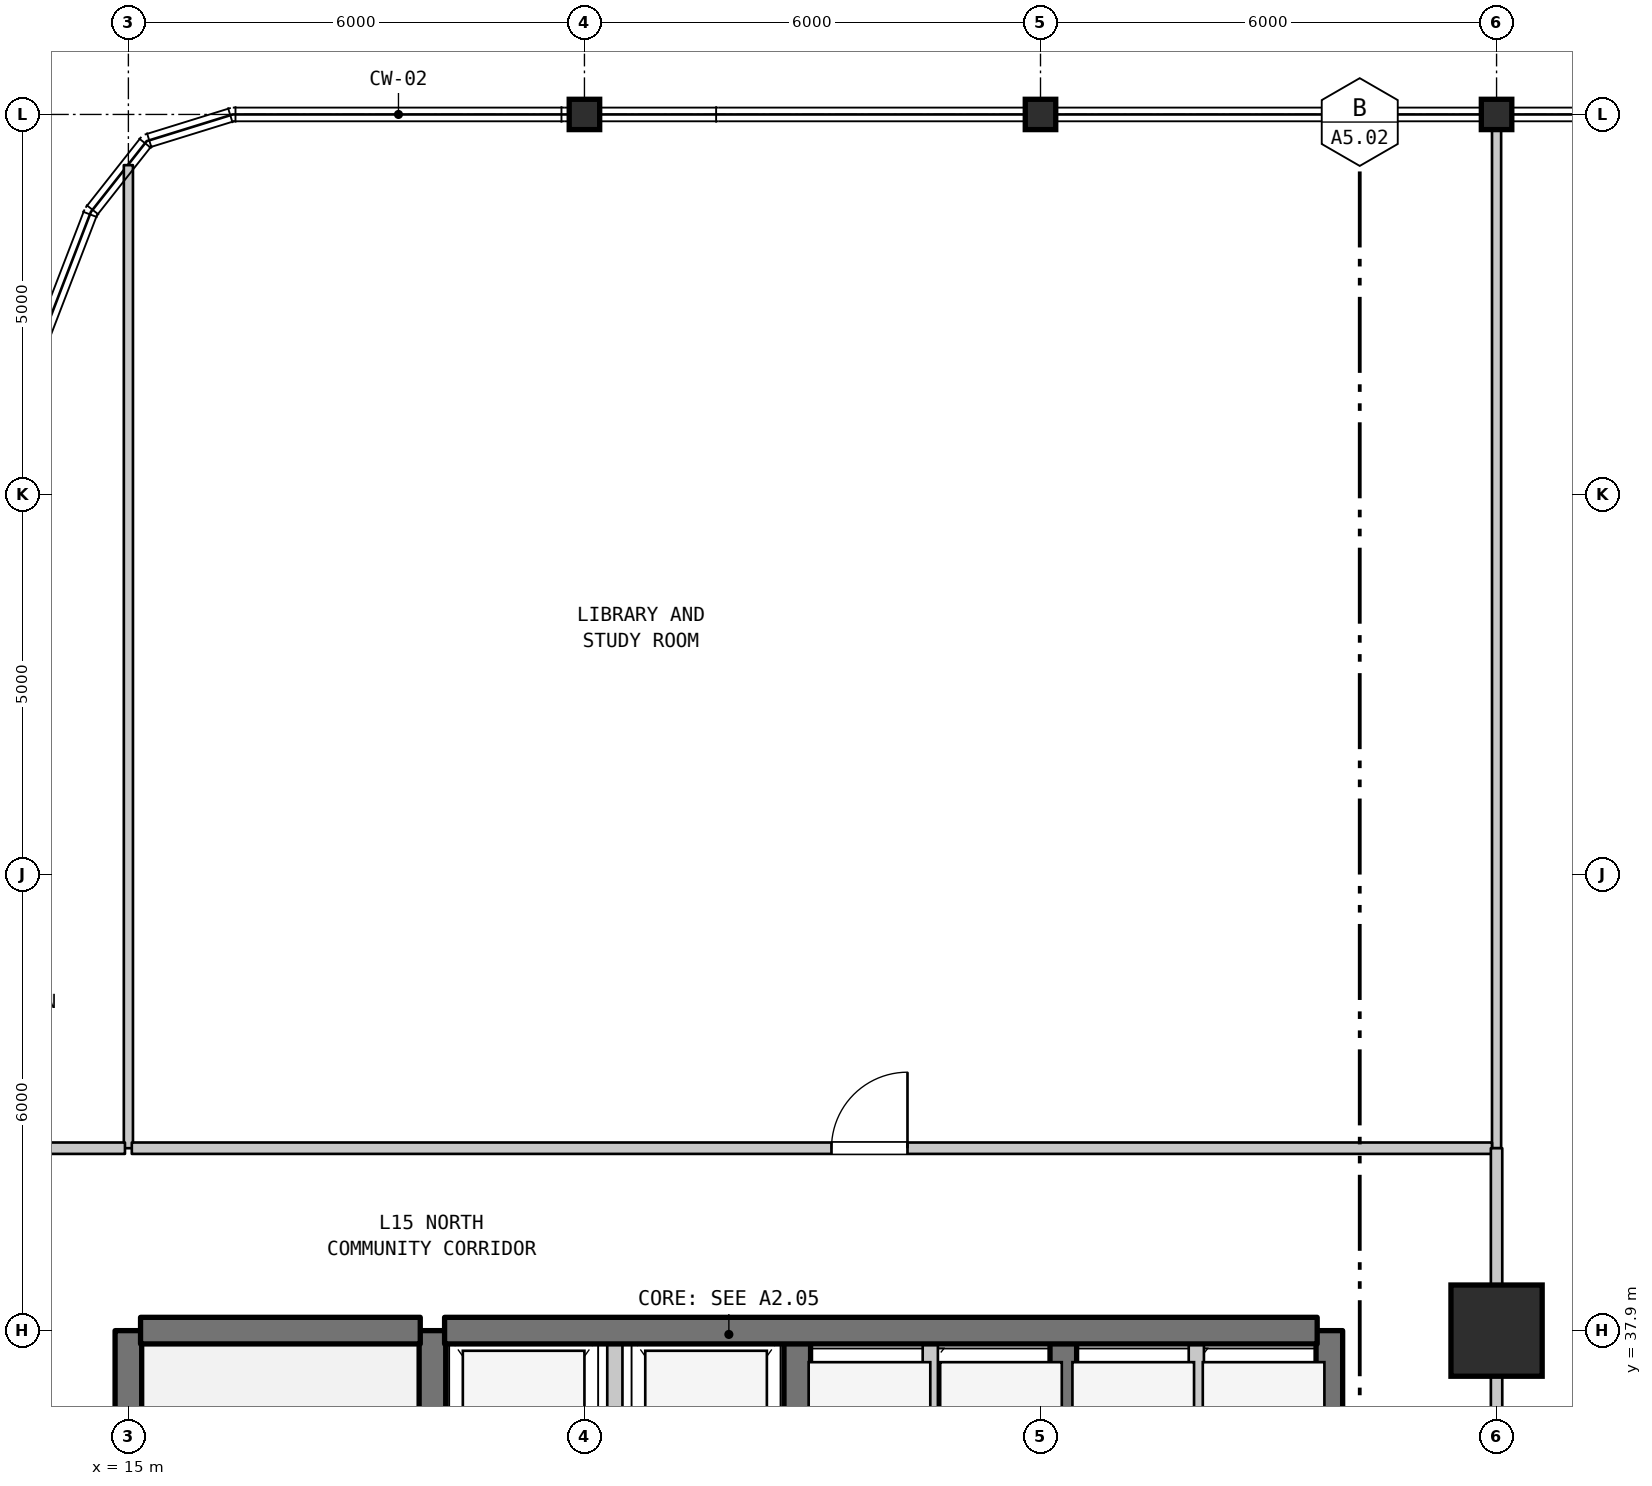
"""IFC4 building model, lengths in metres.
Left out: names, types, materials, properties, quantities, classifications, styles, units other than length and angle.
Written with IfcOpenShell. Run it as: python <this file> out.ifc"""

import sys

from ifc_helpers import new_model, si_unit, direction, frame, frame_2d, origin, origin_2d, place, context, subcontext, project, spatial, rectangle, i_section, extrude, element, fill, save


model = new_model("IFC4")
c1 = context("Model", 3, precision=1e-05, world=origin(), true_north=direction((0.0, 1.0)))
c2 = subcontext(c1, "Body", "Model", "MODEL_VIEW")
j1 = project(units=[si_unit("LENGTHUNIT", "METRE"), si_unit("PLANEANGLEUNIT", "RADIAN")], contexts=[c1])
p1 = place(None, origin())
s1 = spatial("IfcSite", under=j1, at=p1, CompositionType="ELEMENT")
p2 = place(p1, origin())
s2 = spatial("IfcBuilding", under=s1, at=p2, CompositionType="ELEMENT")
p3 = place(p2, frame((0.0, 0.0, 65.6)))
s3 = spatial("IfcBuildingStorey", under=s2, at=p3, CompositionType="ELEMENT", Elevation=65.6)
for number, where, z_axis, x_axis in (
    (1, (21.0, 53.9, 0.0), (0.0, 0.0, 1.0), (1.0, 0.0, 0.0)),
    (2, (27.0, 53.9, 0.0), (0.0, 0.0, 1.0), (1.0, 0.0, 0.0)),
):
    element("IfcColumn", number, at=place(p3, frame(where, z_axis=z_axis, x_axis=x_axis)), inside=s3, PredefinedType="COLUMN", context=c2, shape_type="SweptSolid", body=[
        extrude(i_section(OverallWidth=0.401, OverallDepth=0.399, WebThickness=0.025, FlangeThickness=0.04, FilletRadius=0.015, at=origin_2d()), origin(), (0.0, 0.0, 1.0), 4.5),
    ])
p4 = place(p3, frame((33.0, 37.9, 0.0), z_axis=(0.0, 0.0, 1.0), x_axis=(1.0, 0.0, 0.0)))
e3 = element("IfcColumn", 3, at=p4, inside=s3, PredefinedType="COLUMN", context=c2, shape_type="SweptSolid", body=[
    extrude(rectangle(XDim=1.2, YDim=1.2, at=origin_2d()), origin(), (0.0, 0.0, 1.0), 4.5),
])
p5 = place(p3, frame((33.0, 53.9, 0.0), z_axis=(0.0, 0.0, 1.0), x_axis=(1.0, 0.0, 0.0)))
e4 = element("IfcColumn", 4, at=p5, inside=s3, PredefinedType="COLUMN", context=c2, shape_type="SweptSolid", body=[
    extrude(i_section(OverallWidth=0.401, OverallDepth=0.399, WebThickness=0.025, FlangeThickness=0.04, FilletRadius=0.015, at=origin_2d()), origin(), (0.0, 0.0, 1.0), 4.5),
])
p6 = place(p3, frame((15.0, 31.1, 0.0), z_axis=(0.0, 0.0, 1.0), x_axis=(0.0, 1.0, 0.0)))
e5 = element("IfcWall", 5, at=p6, inside=s3, PredefinedType="SHEAR", context=c2, shape_type="SweptSolid", body=[
    extrude(rectangle(XDim=6.8, YDim=0.35, at=frame_2d((3.4, 0.0))), origin(), (0.0, 0.0, 1.0), 4.185),
])
p7 = place(p3, frame((15.0, 40.3, 0.0), z_axis=(0.0, 0.0, 1.0), x_axis=(0.0, 1.0, 0.0)))
e6 = element("IfcWall", 6, at=p7, inside=s3, PredefinedType="PARTITIONING", context=c2, shape_type="SweptSolid", body=[
    extrude(rectangle(XDim=12.933, YDim=0.12, at=frame_2d((6.466, 0.0))), origin(), (0.0, 0.0, 1.0), 4.185),
])
p8 = place(p3, frame((19.0, 35.0, 0.0), z_axis=(0.0, 0.0, 1.0), x_axis=(0.0, 1.0, 0.0)))
e7 = element("IfcWall", 7, at=p8, inside=s3, PredefinedType="SHEAR", context=c2, shape_type="SweptSolid", body=[
    extrude(rectangle(XDim=2.9, YDim=0.35, at=frame_2d((1.45, 0.0))), origin(), (0.0, 0.0, 1.0), 4.185),
])
p9 = place(p3, frame((21.4, 35.0, 0.0), z_axis=(0.0, 0.0, 1.0), x_axis=(0.0, 1.0, 0.0)))
e8 = element("IfcWall", 8, at=p9, inside=s3, PredefinedType="STANDARD", context=c2, shape_type="SweptSolid", body=[
    extrude(rectangle(XDim=2.9, YDim=0.2, at=frame_2d((1.45, 0.0))), origin(), (0.0, 0.0, 1.0), 4.185),
])
p10 = place(p3, frame((23.8, 35.0, 0.0), z_axis=(0.0, 0.0, 1.0), x_axis=(0.0, 1.0, 0.0)))
e9 = element("IfcWall", 9, at=p10, inside=s3, PredefinedType="SHEAR", context=c2, shape_type="SweptSolid", body=[
    extrude(rectangle(XDim=2.9, YDim=0.35, at=frame_2d((1.45, 0.0))), origin(), (0.0, 0.0, 1.0), 4.185),
])
p11 = place(p3, frame((25.55, 35.0, 0.0), z_axis=(0.0, 0.0, 1.0), x_axis=(0.0, 1.0, 0.0)))
e10 = element("IfcWall", 10, at=p11, inside=s3, PredefinedType="STANDARD", context=c2, shape_type="SweptSolid", body=[
    extrude(rectangle(XDim=2.9, YDim=0.2, at=frame_2d((1.45, 0.0))), origin(), (0.0, 0.0, 1.0), 4.185),
])
p12 = place(p3, frame((27.3, 35.0, 0.0), z_axis=(0.0, 0.0, 1.0), x_axis=(0.0, 1.0, 0.0)))
e11 = element("IfcWall", 11, at=p12, inside=s3, PredefinedType="SHEAR", context=c2, shape_type="SweptSolid", body=[
    extrude(rectangle(XDim=2.9, YDim=0.35, at=frame_2d((1.45, 0.0))), origin(), (0.0, 0.0, 1.0), 4.185),
])
p13 = place(p3, frame((29.05, 35.0, 0.0), z_axis=(0.0, 0.0, 1.0), x_axis=(0.0, 1.0, 0.0)))
e12 = element("IfcWall", 12, at=p13, inside=s3, PredefinedType="STANDARD", context=c2, shape_type="SweptSolid", body=[
    extrude(rectangle(XDim=2.9, YDim=0.2, at=frame_2d((1.45, 0.0))), origin(), (0.0, 0.0, 1.0), 4.185),
])
p14 = place(p3, frame((30.8, 35.0, 0.0), z_axis=(0.0, 0.0, 1.0), x_axis=(0.0, 1.0, 0.0)))
e13 = element("IfcWall", 13, at=p14, inside=s3, PredefinedType="SHEAR", context=c2, shape_type="SweptSolid", body=[
    extrude(rectangle(XDim=2.9, YDim=0.35, at=frame_2d((1.45, 0.0))), origin(), (0.0, 0.0, 1.0), 4.185),
])
p15 = place(p3, frame((33.0, 27.9, 0.0), z_axis=(0.0, 0.0, 1.0), x_axis=(0.0, 1.0, 0.0)))
e14 = element("IfcWall", 14, at=p15, inside=s3, PredefinedType="STANDARD", context=c2, shape_type="SweptSolid", body=[
    extrude(rectangle(XDim=10.0, YDim=0.15, at=frame_2d((5.0, 0.0))), origin(), (0.0, 0.0, 1.0), 3.685),
])
p16 = place(p3, frame((33.0, 40.3, 0.0), z_axis=(0.0, 0.0, 1.0), x_axis=(0.0, 1.0, 0.0)))
e15 = element("IfcWall", 15, at=p16, inside=s3, PredefinedType="PARTITIONING", context=c2, shape_type="SweptSolid", body=[
    extrude(rectangle(XDim=13.59, YDim=0.12, at=frame_2d((6.795, 0.0))), origin(), (0.0, 0.0, 1.0), 3.585),
])
p17 = place(p3, frame((15.16, 37.9, 0.0), z_axis=(0.0, 0.0, 1.0), x_axis=(1.0, 0.0, 0.0)))
e16 = element("IfcWall", 16, at=p17, inside=s3, PredefinedType="SHEAR", context=c2, shape_type="SweptSolid", body=[
    extrude(rectangle(XDim=3.68, YDim=0.35, at=frame_2d((1.84, 0.0))), origin(), (0.0, 0.0, 1.0), 4.185),
])
p18 = place(p3, frame((19.16, 37.9, 0.0), z_axis=(0.0, 0.0, 1.0), x_axis=(1.0, 0.0, 0.0)))
e17 = element("IfcWall", 17, at=p18, inside=s3, PredefinedType="SHEAR", context=c2, shape_type="SweptSolid", body=[
    extrude(rectangle(XDim=11.48, YDim=0.35, at=frame_2d((5.74, 0.0))), origin(), (0.0, 0.0, 1.0), 4.185),
])
p19 = place(p3, frame((12.66, 40.3, 0.0), z_axis=(0.0, 0.0, 1.0), x_axis=(1.0, 0.0, 0.0)))
e18 = element("IfcWall", 18, at=p19, inside=s3, PredefinedType="STANDARD", context=c2, shape_type="SweptSolid", body=[
    extrude(rectangle(XDim=2.295, YDim=0.15, at=frame_2d((1.147, 0.0))), origin(), (0.0, 0.0, 1.0), 4.185),
])
p20 = place(p3, frame((15.045, 40.3, 0.0), z_axis=(0.0, 0.0, 1.0), x_axis=(1.0, 0.0, 0.0)))
e19 = element("IfcWall", 19, at=p20, inside=s3, PredefinedType="STANDARD", context=c2, shape_type="SweptSolid", body=[
    extrude(rectangle(XDim=17.895, YDim=0.15, at=frame_2d((8.948, 0.0))), origin(), (0.0, 0.0, 1.0), 4.185),
])
p21 = place(p20, frame((9.205, 0.0, 0.0)))
e20 = element("IfcOpeningElement", 20, at=p21, cuts=e19, PredefinedType="OPENING", context=c2, shape_type="SweptSolid", body=[
    extrude(rectangle(XDim=1.0, YDim=2.15, at=frame_2d((0.5, 1.075))), frame((0.0, 0.085, 0.0), z_axis=(0.0, -1.0, 0.0), x_axis=(1.0, 0.0, 0.0)), (0.0, 0.0, 1.0), 0.17),
])
p22 = place(p3, frame((33.0, 37.9, 0.0), z_axis=(0.0, 0.0, 1.0), x_axis=(0.0, 1.0, 0.0)))
e21 = element("IfcWall", 21, at=p22, inside=s3, PredefinedType="STANDARD", context=c2, shape_type="SweptSolid", body=[
    extrude(rectangle(XDim=2.4, YDim=0.15, at=frame_2d((1.2, 0.0))), origin(), (0.0, 0.0, 1.0), 3.585),
])
p23 = place(p21, origin())
e22 = element("IfcDoor", 22, at=p23, inside=s3, OperationType="SINGLE_SWING_RIGHT", PredefinedType="DOOR", context=c2, shape_type="SweptSolid", body=[
    extrude(rectangle(XDim=1.0, YDim=2.15, at=frame_2d((0.5, 1.075))), frame((0.0, 0.025, 0.0), z_axis=(0.0, -1.0, 0.0), x_axis=(1.0, 0.0, 0.0)), (0.0, 0.0, 1.0), 0.05),
])
fill(e20, e22)
save(model, sys.argv[1])
